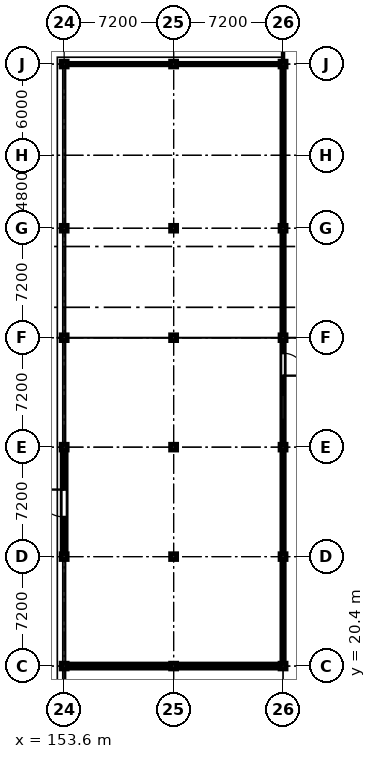
"""IFC4 building model, lengths in metres.
Left out: names, types, materials, properties, quantities, classifications, styles, units other than length and angle.
Written with IfcOpenShell. Run it as: python <this file> out.ifc"""

import sys

from ifc_helpers import new_model, si_unit, direction, frame, frame_2d, origin, origin_2d, place, context, subcontext, project, spatial, rectangle, i_section, extrude, element, fill, save


model = new_model("IFC4")
c1 = context("Model", 3, precision=1e-05, world=origin(), true_north=direction((0.0, 1.0)))
c2 = subcontext(c1, "Body", "Model", "MODEL_VIEW")
j1 = project(units=[si_unit("LENGTHUNIT", "METRE"), si_unit("PLANEANGLEUNIT", "RADIAN")], contexts=[c1])
p1 = place(None, origin())
s1 = spatial("IfcSite", under=j1, at=p1, CompositionType="ELEMENT")
p2 = place(p1, origin())
s2 = spatial("IfcBuilding", under=s1, at=p2, CompositionType="ELEMENT")
p3 = place(p2, origin())
s3 = spatial("IfcBuildingStorey", under=s2, at=p3, CompositionType="ELEMENT", Elevation=0.0)
for number, where, z_axis, x_axis in (
    (1, (153.6, 20.4, 0.0), (0.0, 0.0, 1.0), (1.0, 0.0, 0.0)),
    (2, (153.6, 27.6, 0.0), (0.0, 0.0, 1.0), (1.0, 0.0, 0.0)),
    (3, (153.6, 34.8, 0.0), (0.0, 0.0, 1.0), (1.0, 0.0, 0.0)),
    (4, (153.6, 42.0, 0.0), (0.0, 0.0, 1.0), (1.0, 0.0, 0.0)),
    (5, (153.6, 49.2, 0.0), (0.0, 0.0, 1.0), (1.0, 0.0, 0.0)),
    (6, (153.6, 60.0, 0.0), (0.0, 0.0, 1.0), (1.0, 0.0, 0.0)),
    (7, (160.8, 20.4, 0.0), (0.0, 0.0, 1.0), (1.0, 0.0, 0.0)),
    (8, (160.8, 27.6, 0.0), (0.0, 0.0, 1.0), (1.0, 0.0, 0.0)),
    (9, (160.8, 34.8, 0.0), (0.0, 0.0, 1.0), (1.0, 0.0, 0.0)),
    (10, (160.8, 42.0, 0.0), (0.0, 0.0, 1.0), (1.0, 0.0, 0.0)),
    (11, (160.8, 49.2, 0.0), (0.0, 0.0, 1.0), (1.0, 0.0, 0.0)),
    (12, (160.8, 60.0, 0.0), (0.0, 0.0, 1.0), (1.0, 0.0, 0.0)),
    (13, (168.0, 20.4, 0.0), (0.0, 0.0, 1.0), (1.0, 0.0, 0.0)),
    (14, (168.0, 27.6, 0.0), (0.0, 0.0, 1.0), (1.0, 0.0, 0.0)),
    (15, (168.0, 34.8, 0.0), (0.0, 0.0, 1.0), (1.0, 0.0, 0.0)),
    (16, (168.0, 42.0, 0.0), (0.0, 0.0, 1.0), (1.0, 0.0, 0.0)),
    (17, (168.0, 49.2, 0.0), (0.0, 0.0, 1.0), (1.0, 0.0, 0.0)),
    (18, (168.0, 60.0, 0.0), (0.0, 0.0, 1.0), (1.0, 0.0, 0.0)),
):
    element("IfcColumn", number, at=place(p3, frame(where, z_axis=z_axis, x_axis=x_axis)), inside=s3, PredefinedType="COLUMN", context=c2, shape_type="SweptSolid", body=[
        extrude(i_section(OverallWidth=0.396, OverallDepth=0.381, WebThickness=0.019, FlangeThickness=0.03, FilletRadius=0.015, at=origin_2d()), origin(), (0.0, 0.0, 1.0), 5.4),
    ])
p4 = place(p3, frame((153.6, 27.792, 0.0), z_axis=(0.0, 0.0, 1.0), x_axis=(0.0, 1.0, 0.0)))
e19 = element("IfcWall", 19, at=p4, inside=s3, PredefinedType="STANDARD", context=c2, shape_type="SweptSolid", body=[
    extrude(rectangle(XDim=6.816, YDim=0.26, at=frame_2d((3.408, 0.0))), origin(), (0.0, 0.0, 1.0), 4.442),
])
p5 = place(p4, frame((2.418, 0.0, 0.0)))
e20 = element("IfcOpeningElement", 20, at=p5, cuts=e19, PredefinedType="OPENING", context=c2, shape_type="SweptSolid", body=[
    extrude(rectangle(XDim=1.8, YDim=2.2, at=frame_2d((0.9, 1.1))), frame((0.0, 0.14, 0.0), z_axis=(0.0, -1.0, 0.0), x_axis=(1.0, 0.0, 0.0)), (0.0, 0.0, 1.0), 0.28),
])
p6 = place(p3, frame((168.08, 20.4, 0.0), z_axis=(0.0, 0.0, 1.0), x_axis=(-1.0, 0.0, 0.0)))
e21 = element("IfcWall", 21, at=p6, inside=s3, PredefinedType="PARTITIONING", context=c2, shape_type="SweptSolid", body=[
    extrude(rectangle(XDim=14.348, YDim=0.27, at=frame_2d((7.174, 0.0))), origin(), (0.0, 0.0, 1.0), 4.437),
])
p7 = place(p3, frame((153.732, 60.0, 0.0), z_axis=(0.0, 0.0, 1.0), x_axis=(1.0, 0.0, 0.0)))
e22 = element("IfcWall", 22, at=p7, inside=s3, PredefinedType="PARTITIONING", context=c2, shape_type="SweptSolid", body=[
    extrude(rectangle(XDim=14.348, YDim=0.095, at=frame_2d((7.174, 0.0))), origin(), (0.0, 0.0, 1.0), 4.437),
])
p8 = place(p3, frame((168.0, 59.95, 0.0), z_axis=(0.0, 0.0, 1.0), x_axis=(0.0, -1.0, 0.0)))
e23 = element("IfcWall", 23, at=p8, inside=s3, PredefinedType="PARTITIONING", context=c2, shape_type="SweptSolid", body=[
    extrude(rectangle(XDim=39.413, YDim=0.155, at=frame_2d((19.707, 0.0))), origin(), (0.0, 0.0, 1.0), 4.437),
])
p9 = place(p8, frame((18.967, 0.0, 0.0)))
e24 = element("IfcOpeningElement", 24, at=p9, cuts=e23, PredefinedType="OPENING", context=c2, shape_type="SweptSolid", body=[
    extrude(rectangle(XDim=1.48, YDim=2.22, at=frame_2d((0.74, 1.11))), frame((0.0, 0.087, 0.0), z_axis=(0.0, -1.0, 0.0), x_axis=(1.0, 0.0, 0.0)), (0.0, 0.0, 1.0), 0.175),
])
p10 = place(p8, frame((21.697, 0.0, 0.95)))
e25 = element("IfcOpeningElement", 25, at=p10, cuts=e23, PredefinedType="OPENING", context=c2, shape_type="SweptSolid", body=[
    extrude(rectangle(XDim=1.65, YDim=1.3, at=frame_2d((0.825, 0.65))), frame((0.0, 0.087, 0.0), z_axis=(0.0, -1.0, 0.0), x_axis=(1.0, 0.0, 0.0)), (0.0, 0.0, 1.0), 0.175),
])
p11 = place(p5, origin())
e26 = element("IfcDoor", 26, at=p11, inside=s3, OperationType="SINGLE_SWING_RIGHT", PredefinedType="DOOR", context=c2, shape_type="SweptSolid", body=[
    extrude(rectangle(XDim=1.8, YDim=2.2, at=frame_2d((0.9, 1.1))), frame((0.0, 0.025, 0.0), z_axis=(0.0, -1.0, 0.0), x_axis=(1.0, 0.0, 0.0)), (0.0, 0.0, 1.0), 0.05),
])
fill(e20, e26)
p12 = place(p9, origin())
e27 = element("IfcDoor", 27, at=p12, inside=s3, OperationType="SINGLE_SWING_RIGHT", PredefinedType="DOOR", context=c2, shape_type="SweptSolid", body=[
    extrude(rectangle(XDim=1.48, YDim=2.22, at=frame_2d((0.74, 1.11))), frame((0.0, 0.025, 0.0), z_axis=(0.0, -1.0, 0.0), x_axis=(1.0, 0.0, 0.0)), (0.0, 0.0, 1.0), 0.05),
])
fill(e24, e27)
p13 = place(p10, origin())
e28 = element("IfcWindow", 28, at=p13, inside=s3, PartitioningType="SINGLE_PANEL", PredefinedType="WINDOW", context=c2, shape_type="SweptSolid", body=[
    extrude(rectangle(XDim=1.65, YDim=1.3, at=frame_2d((0.825, 0.65))), frame((0.0, 0.03, 0.0), z_axis=(0.0, -1.0, 0.0), x_axis=(1.0, 0.0, 0.0)), (0.0, 0.0, 1.0), 0.06),
])
fill(e25, e28)
save(model, sys.argv[1])
